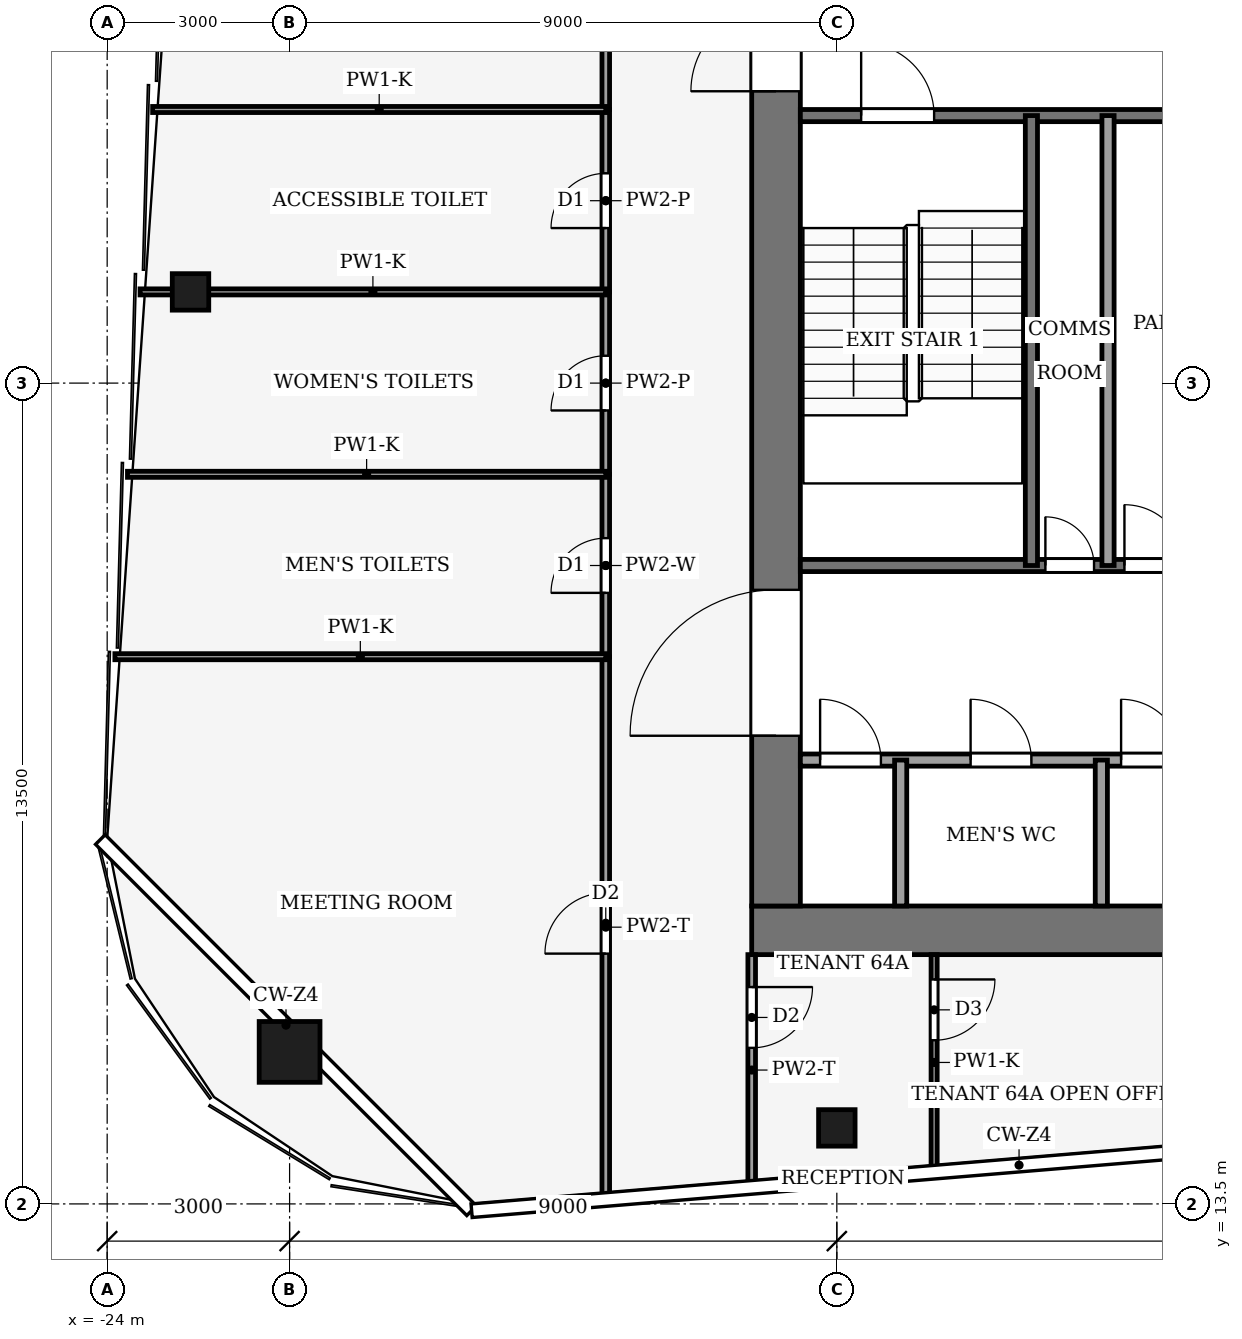
"""IFC4 building model, lengths in metres.
Left out: names, types, materials, properties, quantities, classifications, styles, units other than length and angle.
Written with IfcOpenShell. Run it as: python <this file> out.ifc"""

import sys

from ifc_helpers import new_model, si_unit, direction, frame, frame_2d, origin, origin_2d, place, context, subcontext, project, spatial, rectangle, hollow_rectangle, extrude, element, fill, save


model = new_model("IFC4")
c1 = context("Model", 3, precision=1e-05, world=origin(), true_north=direction((0.0, 1.0)))
c2 = subcontext(c1, "Body", "Model", "MODEL_VIEW")
j1 = project(units=[si_unit("LENGTHUNIT", "METRE"), si_unit("PLANEANGLEUNIT", "RADIAN")], contexts=[c1])
p1 = place(None, origin())
s1 = spatial("IfcSite", under=j1, at=p1, CompositionType="ELEMENT")
p2 = place(p1, origin())
s2 = spatial("IfcBuilding", under=s1, at=p2, CompositionType="ELEMENT")
p3 = place(p2, frame((0.0, 0.0, 278.0)))
s3 = spatial("IfcBuildingStorey", under=s2, at=p3, CompositionType="ELEMENT", Elevation=278.0)
p4 = place(p3, frame((-13.4, 18.0, -0.13), z_axis=(0.0, 0.0, 1.0), x_axis=(1.0, 0.0, 0.0)))
e1 = element("IfcWall", 1, at=p4, inside=s3, PredefinedType="SHEAR", context=c2, shape_type="SweptSolid", body=[
    extrude(rectangle(XDim=26.8, YDim=0.8, at=frame_2d((13.4, 0.0))), origin(), (0.0, 0.0, 1.0), 3.88),
])
p5 = place(p3, frame((-13.0, 18.4, -0.13), z_axis=(0.0, 0.0, 1.0), x_axis=(0.0, 1.0, 0.0)))
e2 = element("IfcWall", 2, at=p5, inside=s3, PredefinedType="SHEAR", context=c2, shape_type="SweptSolid", body=[
    extrude(rectangle(XDim=19.2, YDim=0.8, at=frame_2d((9.6, 0.0))), origin(), (0.0, 0.0, 1.0), 3.88),
])
p6 = place(p5, frame((2.8, 0.0, 0.13)))
e3 = element("IfcOpeningElement", 3, at=p6, cuts=e2, PredefinedType="OPENING", context=c2, shape_type="SweptSolid", body=[
    extrude(rectangle(XDim=2.4, YDim=2.4, at=frame_2d((1.2, 1.2))), frame((0.0, 0.41, 0.0), z_axis=(0.0, -1.0, 0.0), x_axis=(1.0, 0.0, 0.0)), (0.0, 0.0, 1.0), 0.82),
])
p7 = place(p5, frame((13.4, 0.0, 0.13)))
e4 = element("IfcOpeningElement", 4, at=p7, cuts=e2, PredefinedType="OPENING", context=c2, shape_type="SweptSolid", body=[
    extrude(rectangle(XDim=1.4, YDim=2.2, at=frame_2d((0.7, 1.1))), frame((0.0, 0.41, 0.0), z_axis=(0.0, -1.0, 0.0), x_axis=(1.0, 0.0, 0.0)), (0.0, 0.0, 1.0), 0.82),
])
p8 = place(p3, frame((-21.0, 16.0, 0.0), z_axis=(0.0, 0.0, 1.0), x_axis=(1.0, 0.0, 0.0)))
e5 = element("IfcColumn", 5, at=p8, inside=s3, PredefinedType="COLUMN", context=c2, shape_type="SweptSolid", body=[
    extrude(hollow_rectangle(XDim=1.0, YDim=1.0, WallThickness=0.045, at=origin_2d()), origin(), (0.0, 0.0, 1.0), 4.0),
])
for number, where, z_axis, x_axis in (
    (6, (-12.0, 14.75, 0.0), (0.0, 0.0, 1.0), (1.0, 0.0, 0.0)),
    (7, (-22.629, 28.5, 0.0), (0.0, 0.0, 1.0), (1.0, 0.0, 0.0)),
):
    element("IfcColumn", number, at=place(p3, frame(where, z_axis=z_axis, x_axis=x_axis)), inside=s3, PredefinedType="COLUMN", context=c2, shape_type="SweptSolid", body=[
        extrude(hollow_rectangle(XDim=0.6, YDim=0.6, WallThickness=0.025, at=origin_2d()), origin(), (0.0, 0.0, 1.0), 4.0),
    ])
p9 = place(p3, frame((-12.6, 20.8, 0.0), z_axis=(0.0, 0.0, 1.0), x_axis=(1.0, 0.0, 0.0)))
e8 = element("IfcWall", 8, at=p9, inside=s3, PredefinedType="PARTITIONING", context=c2, shape_type="SweptSolid", body=[
    extrude(rectangle(XDim=6.6, YDim=0.2, at=frame_2d((3.3, 0.0))), origin(), (0.0, 0.0, 1.0), 3.75),
])
p10 = place(p9, frame((0.325, 0.0, 0.0)))
e9 = element("IfcOpeningElement", 9, at=p10, cuts=e8, PredefinedType="OPENING", context=c2, shape_type="SweptSolid", body=[
    extrude(rectangle(XDim=1.0, YDim=2.1, at=frame_2d((0.5, 1.05))), frame((0.0, 0.11, 0.0), z_axis=(0.0, -1.0, 0.0), x_axis=(1.0, 0.0, 0.0)), (0.0, 0.0, 1.0), 0.22),
])
p11 = place(p9, frame((2.8, 0.0, 0.0)))
e10 = element("IfcOpeningElement", 10, at=p11, cuts=e8, PredefinedType="OPENING", context=c2, shape_type="SweptSolid", body=[
    extrude(rectangle(XDim=1.0, YDim=2.1, at=frame_2d((0.5, 1.05))), frame((0.0, 0.11, 0.0), z_axis=(0.0, -1.0, 0.0), x_axis=(1.0, 0.0, 0.0)), (0.0, 0.0, 1.0), 0.22),
])
p12 = place(p9, frame((5.275, 0.0, 0.0)))
e11 = element("IfcOpeningElement", 11, at=p12, cuts=e8, PredefinedType="OPENING", context=c2, shape_type="SweptSolid", body=[
    extrude(rectangle(XDim=1.0, YDim=2.1, at=frame_2d((0.5, 1.05))), frame((0.0, 0.11, 0.0), z_axis=(0.0, -1.0, 0.0), x_axis=(1.0, 0.0, 0.0)), (0.0, 0.0, 1.0), 0.22),
])
p13 = place(p3, frame((-12.6, 24.0, 0.0), z_axis=(0.0, 0.0, 1.0), x_axis=(1.0, 0.0, 0.0)))
e12 = element("IfcWall", 12, at=p13, inside=s3, PredefinedType="PARTITIONING", context=c2, shape_type="SweptSolid", body=[
    extrude(rectangle(XDim=6.6, YDim=0.2, at=frame_2d((3.3, 0.0))), origin(), (0.0, 0.0, 1.0), 3.75),
])
p14 = place(p13, frame((4.03, 0.0, 0.0)))
e13 = element("IfcOpeningElement", 13, at=p14, cuts=e12, PredefinedType="OPENING", context=c2, shape_type="SweptSolid", body=[
    extrude(rectangle(XDim=0.8, YDim=2.1, at=frame_2d((0.4, 1.05))), frame((0.0, 0.11, 0.0), z_axis=(0.0, -1.0, 0.0), x_axis=(1.0, 0.0, 0.0)), (0.0, 0.0, 1.0), 0.22),
])
p15 = place(p13, frame((5.33, 0.0, 0.0)))
e14 = element("IfcOpeningElement", 14, at=p15, cuts=e12, PredefinedType="OPENING", context=c2, shape_type="SweptSolid", body=[
    extrude(rectangle(XDim=1.0, YDim=2.1, at=frame_2d((0.5, 1.05))), frame((0.0, 0.11, 0.0), z_axis=(0.0, -1.0, 0.0), x_axis=(1.0, 0.0, 0.0)), (0.0, 0.0, 1.0), 0.22),
])
p16 = place(p3, frame((-12.6, 31.4, 0.0), z_axis=(0.0, 0.0, 1.0), x_axis=(1.0, 0.0, 0.0)))
e15 = element("IfcWall", 15, at=p16, inside=s3, PredefinedType="PARTITIONING", context=c2, shape_type="SweptSolid", body=[
    extrude(rectangle(XDim=6.6, YDim=0.2, at=frame_2d((3.3, 0.0))), origin(), (0.0, 0.0, 1.0), 3.75),
])
p17 = place(p16, frame((1.0, 0.0, 0.0)))
e16 = element("IfcOpeningElement", 16, at=p17, cuts=e15, PredefinedType="OPENING", context=c2, shape_type="SweptSolid", body=[
    extrude(rectangle(XDim=1.2, YDim=2.2, at=frame_2d((0.6, 1.1))), frame((0.0, 0.11, 0.0), z_axis=(0.0, -1.0, 0.0), x_axis=(1.0, 0.0, 0.0)), (0.0, 0.0, 1.0), 0.22),
])
p18 = place(p3, frame((-10.95, 18.4, 0.0), z_axis=(0.0, 0.0, 1.0), x_axis=(0.0, 1.0, 0.0)))
e17 = element("IfcWall", 17, at=p18, inside=s3, PredefinedType="PARTITIONING", context=c2, shape_type="SweptSolid", body=[
    extrude(rectangle(XDim=2.4, YDim=0.2, at=frame_2d((1.2, 0.0))), origin(), (0.0, 0.0, 1.0), 3.75),
])
p19 = place(p3, frame((-8.8, 24.0, 0.0), z_axis=(0.0, 0.0, 1.0), x_axis=(0.0, 1.0, 0.0)))
e18 = element("IfcWall", 18, at=p19, inside=s3, PredefinedType="PARTITIONING", context=c2, shape_type="SweptSolid", body=[
    extrude(rectangle(XDim=7.4, YDim=0.2, at=frame_2d((3.7, 0.0))), origin(), (0.0, 0.0, 1.0), 3.75),
])
p20 = place(p3, frame((-7.65, 18.4, 0.0), z_axis=(0.0, 0.0, 1.0), x_axis=(0.0, 1.0, 0.0)))
e19 = element("IfcWall", 19, at=p20, inside=s3, PredefinedType="PARTITIONING", context=c2, shape_type="SweptSolid", body=[
    extrude(rectangle(XDim=2.4, YDim=0.2, at=frame_2d((1.2, 0.0))), origin(), (0.0, 0.0, 1.0), 3.75),
])
p21 = place(p3, frame((-7.54, 24.0, 0.0), z_axis=(0.0, 0.0, 1.0), x_axis=(0.0, 1.0, 0.0)))
e20 = element("IfcWall", 20, at=p21, inside=s3, PredefinedType="PARTITIONING", context=c2, shape_type="SweptSolid", body=[
    extrude(rectangle(XDim=7.4, YDim=0.2, at=frame_2d((3.7, 0.0))), origin(), (0.0, 0.0, 1.0), 3.75),
])
p22 = place(p3, frame((-15.8, 13.603, 0.0), z_axis=(0.0, 0.0, 1.0), x_axis=(0.0, 1.0, 0.0)))
e21 = element("IfcWall", 21, at=p22, inside=s3, PredefinedType="PARTITIONING", context=c2, shape_type="SweptSolid", body=[
    extrude(rectangle(XDim=8.897, YDim=0.125, at=frame_2d((4.448, 0.0))), origin(), (0.0, 0.0, 1.0), 2.92),
])
p23 = place(p22, frame((4.013, 0.0, 0.0)))
e22 = element("IfcOpeningElement", 22, at=p23, cuts=e21, PredefinedType="OPENING", context=c2, shape_type="SweptSolid", body=[
    extrude(rectangle(XDim=1.0, YDim=2.1, at=frame_2d((0.5, 1.05))), frame((0.0, 0.073, 0.0), z_axis=(0.0, -1.0, 0.0), x_axis=(1.0, 0.0, 0.0)), (0.0, 0.0, 1.0), 0.145),
])
p24 = place(p3, frame((-15.8, 22.5, 0.0), z_axis=(0.0, 0.0, 1.0), x_axis=(0.0, 1.0, 0.0)))
e23 = element("IfcWall", 23, at=p24, inside=s3, PredefinedType="PARTITIONING", context=c2, shape_type="SweptSolid", body=[
    extrude(rectangle(XDim=3.0, YDim=0.125, at=frame_2d((1.5, 0.0))), origin(), (0.0, 0.0, 1.0), 3.32),
])
p25 = place(p24, frame((1.05, 0.0, 0.0)))
e24 = element("IfcOpeningElement", 24, at=p25, cuts=e23, PredefinedType="OPENING", context=c2, shape_type="SweptSolid", body=[
    extrude(rectangle(XDim=0.9, YDim=2.1, at=frame_2d((0.45, 1.05))), frame((0.0, 0.073, 0.0), z_axis=(0.0, -1.0, 0.0), x_axis=(1.0, 0.0, 0.0)), (0.0, 0.0, 1.0), 0.145),
])
p26 = place(p3, frame((-15.8, 25.5, 0.0), z_axis=(0.0, 0.0, 1.0), x_axis=(0.0, 1.0, 0.0)))
e25 = element("IfcWall", 25, at=p26, inside=s3, PredefinedType="PARTITIONING", context=c2, shape_type="SweptSolid", body=[
    extrude(rectangle(XDim=3.0, YDim=0.125, at=frame_2d((1.5, 0.0))), origin(), (0.0, 0.0, 1.0), 3.75),
])
p27 = place(p26, frame((1.05, 0.0, 0.0)))
e26 = element("IfcOpeningElement", 26, at=p27, cuts=e25, PredefinedType="OPENING", context=c2, shape_type="SweptSolid", body=[
    extrude(rectangle(XDim=0.9, YDim=2.1, at=frame_2d((0.45, 1.05))), frame((0.0, 0.073, 0.0), z_axis=(0.0, -1.0, 0.0), x_axis=(1.0, 0.0, 0.0)), (0.0, 0.0, 1.0), 0.145),
])
p28 = place(p3, frame((-15.8, 28.5, 0.0), z_axis=(0.0, 0.0, 1.0), x_axis=(0.0, 1.0, 0.0)))
e27 = element("IfcWall", 27, at=p28, inside=s3, PredefinedType="PARTITIONING", context=c2, shape_type="SweptSolid", body=[
    extrude(rectangle(XDim=3.0, YDim=0.125, at=frame_2d((1.5, 0.0))), origin(), (0.0, 0.0, 1.0), 3.75),
])
p29 = place(p28, frame((1.05, 0.0, 0.0)))
e28 = element("IfcOpeningElement", 28, at=p29, cuts=e27, PredefinedType="OPENING", context=c2, shape_type="SweptSolid", body=[
    extrude(rectangle(XDim=0.9, YDim=2.1, at=frame_2d((0.45, 1.05))), frame((0.0, 0.073, 0.0), z_axis=(0.0, -1.0, 0.0), x_axis=(1.0, 0.0, 0.0)), (0.0, 0.0, 1.0), 0.145),
])
p30 = place(p3, frame((-15.8, 31.5, 0.0), z_axis=(0.0, 0.0, 1.0), x_axis=(0.0, 1.0, 0.0)))
e29 = element("IfcWall", 29, at=p30, inside=s3, PredefinedType="PARTITIONING", context=c2, shape_type="SweptSolid", body=[
    extrude(rectangle(XDim=12.0, YDim=0.125, at=frame_2d((6.0, 0.0))), origin(), (0.0, 0.0, 1.0), 3.02),
])
p31 = place(p30, frame((5.5, 0.0, 0.0)))
e30 = element("IfcOpeningElement", 30, at=p31, cuts=e29, PredefinedType="OPENING", context=c2, shape_type="SweptSolid", body=[
    extrude(rectangle(XDim=1.0, YDim=2.1, at=frame_2d((0.5, 1.05))), frame((0.0, 0.073, 0.0), z_axis=(0.0, -1.0, 0.0), x_axis=(1.0, 0.0, 0.0)), (0.0, 0.0, 1.0), 0.145),
])
p32 = place(p3, frame((-13.4, 17.6, 0.0), z_axis=(0.0, 0.0, 1.0), x_axis=(0.0, -1.0, 0.0)))
e31 = element("IfcWall", 31, at=p32, inside=s3, PredefinedType="PARTITIONING", context=c2, shape_type="SweptSolid", body=[
    extrude(rectangle(XDim=3.797, YDim=0.125, at=frame_2d((1.898, 0.0))), origin(), (0.0, 0.0, 1.0), 2.92),
])
p33 = place(p32, frame((0.533, 0.0, 0.0)))
e32 = element("IfcOpeningElement", 32, at=p33, cuts=e31, PredefinedType="OPENING", context=c2, shape_type="SweptSolid", body=[
    extrude(rectangle(XDim=1.0, YDim=2.1, at=frame_2d((0.5, 1.05))), frame((0.0, 0.073, 0.0), z_axis=(0.0, -1.0, 0.0), x_axis=(1.0, 0.0, 0.0)), (0.0, 0.0, 1.0), 0.145),
])
p34 = place(p3, frame((-15.8, 22.5, 0.0), z_axis=(0.0, 0.0, 1.0), x_axis=(-1.0, 0.0, 0.0)))
e33 = element("IfcWall", 33, at=p34, inside=s3, PredefinedType="PARTITIONING", context=c2, shape_type="SweptSolid", body=[
    extrude(rectangle(XDim=8.073, YDim=0.1, at=frame_2d((4.037, 0.0))), origin(), (0.0, 0.0, 1.0), 2.92),
])
p35 = place(p3, frame((-15.8, 25.5, 0.0), z_axis=(0.0, 0.0, 1.0), x_axis=(-1.0, 0.0, 0.0)))
e34 = element("IfcWall", 34, at=p35, inside=s3, PredefinedType="PARTITIONING", context=c2, shape_type="SweptSolid", body=[
    extrude(rectangle(XDim=7.866, YDim=0.1, at=frame_2d((3.933, 0.0))), origin(), (0.0, 0.0, 1.0), 2.92),
])
p36 = place(p3, frame((-15.8, 28.5, 0.0), z_axis=(0.0, 0.0, 1.0), x_axis=(-1.0, 0.0, 0.0)))
e35 = element("IfcWall", 35, at=p36, inside=s3, PredefinedType="PARTITIONING", context=c2, shape_type="SweptSolid", body=[
    extrude(rectangle(XDim=7.659, YDim=0.1, at=frame_2d((3.83, 0.0))), origin(), (0.0, 0.0, 1.0), 2.92),
])
p37 = place(p3, frame((-15.8, 31.5, 0.0), z_axis=(0.0, 0.0, 1.0), x_axis=(-1.0, 0.0, 0.0)))
e36 = element("IfcWall", 36, at=p37, inside=s3, PredefinedType="PARTITIONING", context=c2, shape_type="SweptSolid", body=[
    extrude(rectangle(XDim=7.452, YDim=0.1, at=frame_2d((3.726, 0.0))), origin(), (0.0, 0.0, 1.0), 2.92),
])
p38 = place(p3, frame((-10.4, 17.6, 0.0), z_axis=(0.0, 0.0, 1.0), x_axis=(0.0, -1.0, 0.0)))
e37 = element("IfcWall", 37, at=p38, inside=s3, PredefinedType="PARTITIONING", context=c2, shape_type="SweptSolid", body=[
    extrude(rectangle(XDim=3.547, YDim=0.1, at=frame_2d((1.773, 0.0))), origin(), (0.0, 0.0, 1.0), 2.92),
])
p39 = place(p38, frame((0.408, 0.0, 0.0)))
e38 = element("IfcOpeningElement", 38, at=p39, cuts=e37, PredefinedType="OPENING", context=c2, shape_type="SweptSolid", body=[
    extrude(rectangle(XDim=1.0, YDim=2.1, at=frame_2d((0.5, 1.05))), frame((0.0, 0.06, 0.0), z_axis=(0.0, -1.0, 0.0), x_axis=(1.0, 0.0, 0.0)), (0.0, 0.0, 1.0), 0.12),
])
p40 = place(p10, origin())
e39 = element("IfcDoor", 39, at=p40, inside=s3, OperationType="SINGLE_SWING_RIGHT", PredefinedType="DOOR", context=c2, shape_type="SweptSolid", body=[
    extrude(rectangle(XDim=1.0, YDim=2.1, at=frame_2d((0.5, 1.05))), frame((0.0, 0.025, 0.0), z_axis=(0.0, -1.0, 0.0), x_axis=(1.0, 0.0, 0.0)), (0.0, 0.0, 1.0), 0.05),
])
fill(e9, e39)
p41 = place(p11, origin())
e40 = element("IfcDoor", 40, at=p41, inside=s3, OperationType="SINGLE_SWING_RIGHT", PredefinedType="DOOR", context=c2, shape_type="SweptSolid", body=[
    extrude(rectangle(XDim=1.0, YDim=2.1, at=frame_2d((0.5, 1.05))), frame((0.0, 0.025, 0.0), z_axis=(0.0, -1.0, 0.0), x_axis=(1.0, 0.0, 0.0)), (0.0, 0.0, 1.0), 0.05),
])
fill(e10, e40)
p42 = place(p12, origin())
e41 = element("IfcDoor", 41, at=p42, inside=s3, OperationType="SINGLE_SWING_RIGHT", PredefinedType="DOOR", context=c2, shape_type="SweptSolid", body=[
    extrude(rectangle(XDim=1.0, YDim=2.1, at=frame_2d((0.5, 1.05))), frame((0.0, 0.025, 0.0), z_axis=(0.0, -1.0, 0.0), x_axis=(1.0, 0.0, 0.0)), (0.0, 0.0, 1.0), 0.05),
])
fill(e11, e41)
p43 = place(p14, origin())
e42 = element("IfcDoor", 42, at=p43, inside=s3, OperationType="SINGLE_SWING_RIGHT", PredefinedType="DOOR", context=c2, shape_type="SweptSolid", body=[
    extrude(rectangle(XDim=0.8, YDim=2.1, at=frame_2d((0.4, 1.05))), frame((0.0, 0.025, 0.0), z_axis=(0.0, -1.0, 0.0), x_axis=(1.0, 0.0, 0.0)), (0.0, 0.0, 1.0), 0.05),
])
fill(e13, e42)
p44 = place(p15, origin())
e43 = element("IfcDoor", 43, at=p44, inside=s3, OperationType="SINGLE_SWING_LEFT", PredefinedType="DOOR", context=c2, shape_type="SweptSolid", body=[
    extrude(rectangle(XDim=1.0, YDim=2.1, at=frame_2d((0.5, 1.05))), frame((0.0, 0.025, 0.0), z_axis=(0.0, -1.0, 0.0), x_axis=(1.0, 0.0, 0.0)), (0.0, 0.0, 1.0), 0.05),
])
fill(e14, e43)
p45 = place(p17, origin())
e44 = element("IfcDoor", 44, at=p45, inside=s3, OperationType="SINGLE_SWING_LEFT", PredefinedType="DOOR", context=c2, shape_type="SweptSolid", body=[
    extrude(rectangle(XDim=1.2, YDim=2.2, at=frame_2d((0.6, 1.1))), frame((0.0, 0.025, 0.0), z_axis=(0.0, -1.0, 0.0), x_axis=(1.0, 0.0, 0.0)), (0.0, 0.0, 1.0), 0.05),
])
fill(e16, e44)
p46 = place(p6, origin())
e45 = element("IfcDoor", 45, at=p46, inside=s3, OperationType="DOUBLE_DOOR_SINGLE_SWING", PredefinedType="DOOR", context=c2, shape_type="SweptSolid", body=[
    extrude(rectangle(XDim=2.4, YDim=2.4, at=frame_2d((1.2, 1.2))), frame((0.0, 0.025, 0.0), z_axis=(0.0, -1.0, 0.0), x_axis=(1.0, 0.0, 0.0)), (0.0, 0.0, 1.0), 0.05),
])
fill(e3, e45)
p47 = place(p7, origin())
e46 = element("IfcDoor", 46, at=p47, inside=s3, OperationType="SINGLE_SWING_LEFT", PredefinedType="DOOR", context=c2, shape_type="SweptSolid", body=[
    extrude(rectangle(XDim=1.4, YDim=2.2, at=frame_2d((0.7, 1.1))), frame((0.0, 0.025, 0.0), z_axis=(0.0, -1.0, 0.0), x_axis=(1.0, 0.0, 0.0)), (0.0, 0.0, 1.0), 0.05),
])
fill(e4, e46)
p48 = place(p23, origin())
e47 = element("IfcDoor", 47, at=p48, inside=s3, OperationType="SINGLE_SWING_RIGHT", PredefinedType="DOOR", context=c2, shape_type="SweptSolid", body=[
    extrude(rectangle(XDim=1.0, YDim=2.1, at=frame_2d((0.5, 1.05))), frame((0.0, 0.025, 0.0), z_axis=(0.0, -1.0, 0.0), x_axis=(1.0, 0.0, 0.0)), (0.0, 0.0, 1.0), 0.05),
])
fill(e22, e47)
p49 = place(p25, origin())
e48 = element("IfcDoor", 48, at=p49, inside=s3, OperationType="SINGLE_SWING_RIGHT", PredefinedType="DOOR", context=c2, shape_type="SweptSolid", body=[
    extrude(rectangle(XDim=0.9, YDim=2.1, at=frame_2d((0.45, 1.05))), frame((0.0, 0.025, 0.0), z_axis=(0.0, -1.0, 0.0), x_axis=(1.0, 0.0, 0.0)), (0.0, 0.0, 1.0), 0.05),
])
fill(e24, e48)
p50 = place(p27, origin())
e49 = element("IfcDoor", 49, at=p50, inside=s3, OperationType="SINGLE_SWING_LEFT", PredefinedType="DOOR", context=c2, shape_type="SweptSolid", body=[
    extrude(rectangle(XDim=0.9, YDim=2.1, at=frame_2d((0.45, 1.05))), frame((0.0, 0.025, 0.0), z_axis=(0.0, -1.0, 0.0), x_axis=(1.0, 0.0, 0.0)), (0.0, 0.0, 1.0), 0.05),
])
fill(e26, e49)
p51 = place(p29, origin())
e50 = element("IfcDoor", 50, at=p51, inside=s3, OperationType="SINGLE_SWING_RIGHT", PredefinedType="DOOR", context=c2, shape_type="SweptSolid", body=[
    extrude(rectangle(XDim=0.9, YDim=2.1, at=frame_2d((0.45, 1.05))), frame((0.0, 0.025, 0.0), z_axis=(0.0, -1.0, 0.0), x_axis=(1.0, 0.0, 0.0)), (0.0, 0.0, 1.0), 0.05),
])
fill(e28, e50)
p52 = place(p33, origin())
e51 = element("IfcDoor", 51, at=p52, inside=s3, OperationType="SINGLE_SWING_LEFT", PredefinedType="DOOR", context=c2, shape_type="SweptSolid", body=[
    extrude(rectangle(XDim=1.0, YDim=2.1, at=frame_2d((0.5, 1.05))), frame((0.0, 0.025, 0.0), z_axis=(0.0, -1.0, 0.0), x_axis=(1.0, 0.0, 0.0)), (0.0, 0.0, 1.0), 0.05),
])
fill(e32, e51)
p53 = place(p39, origin())
e52 = element("IfcDoor", 52, at=p53, inside=s3, OperationType="SINGLE_SWING_LEFT", PredefinedType="DOOR", context=c2, shape_type="SweptSolid", body=[
    extrude(rectangle(XDim=1.0, YDim=2.1, at=frame_2d((0.5, 1.05))), frame((0.0, 0.025, 0.0), z_axis=(0.0, -1.0, 0.0), x_axis=(1.0, 0.0, 0.0)), (0.0, 0.0, 1.0), 0.05),
])
fill(e38, e52)
save(model, sys.argv[1])
